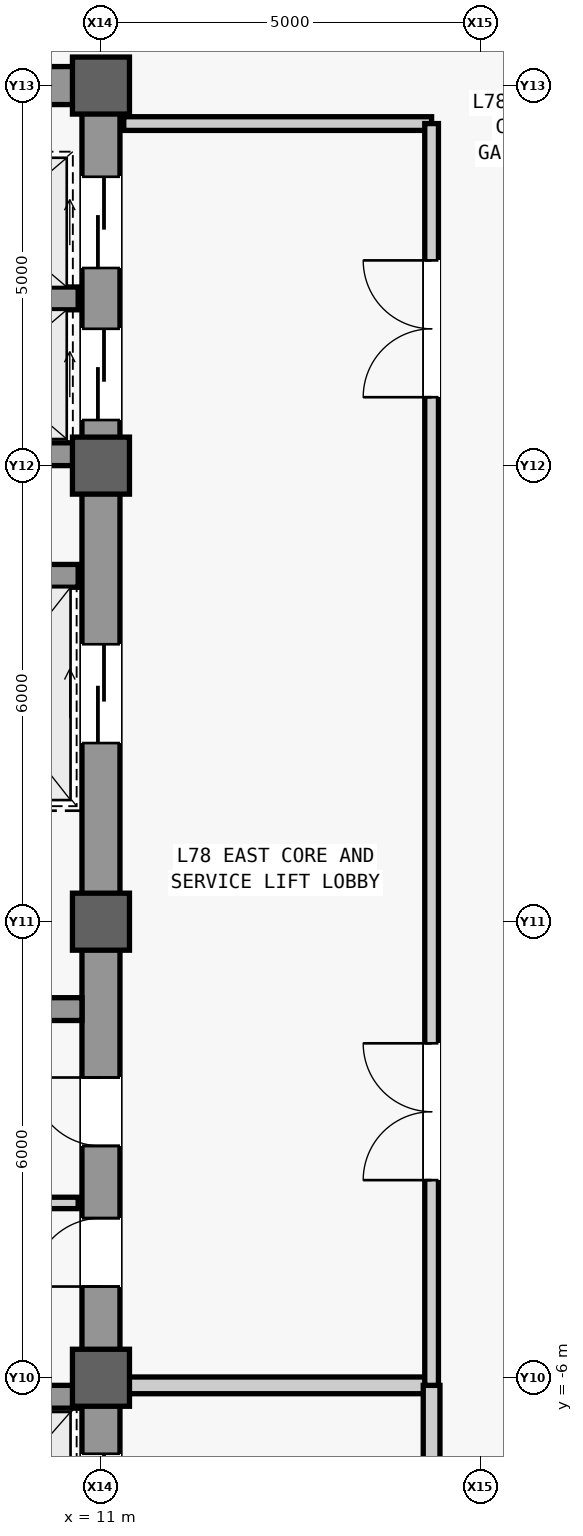
"""IFC4 building model, lengths in metres.
Left out: names, types, materials, properties, quantities, classifications, styles, units other than length and angle.
Written with IfcOpenShell. Run it as: python <this file> out.ifc"""

import sys

from ifc_helpers import new_model, si_unit, direction, frame, frame_2d, origin, origin_2d, place, context, subcontext, project, spatial, rectangle, extrude, source, transform, mapped, element, fill, save


model = new_model("IFC4")
c1 = context("Model", 3, precision=1e-05, world=origin(), true_north=direction((0.0, 1.0)))
c2 = subcontext(c1, "Body", "Model", "MODEL_VIEW")
j1 = project(units=[si_unit("LENGTHUNIT", "METRE"), si_unit("PLANEANGLEUNIT", "RADIAN")], contexts=[c1])
p1 = place(None, origin())
s1 = spatial("IfcSite", under=j1, at=p1, CompositionType="ELEMENT")
p2 = place(p1, origin())
s2 = spatial("IfcBuilding", under=s1, at=p2, CompositionType="ELEMENT")
p3 = place(p2, frame((0.0, 0.0, 330.3)))
s3 = spatial("IfcBuildingStorey", under=s2, at=p3, CompositionType="ELEMENT", Elevation=330.3)
m1 = source(origin(), c2, "Body", "SweptSolid", [
    extrude(rectangle(XDim=22.0, YDim=0.5, at=frame_2d((11.0, 0.0))), origin(), (0.0, 0.0, 1.0), 3.74),
])
p4 = place(p3, frame((11.0, -11.0, 0.0), z_axis=(0.0, 0.0, 1.0), x_axis=(0.0, 1.0, 0.0)))
e1 = element("IfcWall", 1, at=p4, inside=s3, PredefinedType="SHEAR", context=c2, shape_type="MappedRepresentation", body=[
    mapped(m1, transform((0.0, 0.0, 0.0), scale=1.0)),
])
m2 = source(origin(), c2, "Body", "SweptSolid", [
    extrude(rectangle(XDim=1.1, YDim=2.2, at=frame_2d((0.55, 1.1))), frame((0.0, 0.26, 0.0), z_axis=(0.0, -1.0, 0.0), x_axis=(1.0, 0.0, 0.0)), (0.0, 0.0, 1.0), 0.52),
])
p5 = place(p4, frame((0.8, 0.0, 0.0)))
e2 = element("IfcOpeningElement", 2, at=p5, cuts=e1, PredefinedType="OPENING", context=c2, shape_type="MappedRepresentation", body=[
    mapped(m2, transform((0.0, 0.0, 0.0), scale=1.0)),
])
m3 = source(origin(), c2, "Body", "SweptSolid", [
    extrude(rectangle(XDim=0.9, YDim=2.15, at=frame_2d((0.45, 1.075))), frame((0.0, 0.26, 0.0), z_axis=(0.0, -1.0, 0.0), x_axis=(1.0, 0.0, 0.0)), (0.0, 0.0, 1.0), 0.52),
])
p6 = place(p4, frame((6.2, 0.0, 0.0)))
e3 = element("IfcOpeningElement", 3, at=p6, cuts=e1, PredefinedType="OPENING", context=c2, shape_type="MappedRepresentation", body=[
    mapped(m3, transform((0.0, 0.0, 0.0), scale=1.0)),
])
p7 = place(p4, frame((8.05, 0.0, 0.0)))
e4 = element("IfcOpeningElement", 4, at=p7, cuts=e1, PredefinedType="OPENING", context=c2, shape_type="MappedRepresentation", body=[
    mapped(m3, transform((0.0, 0.0, 0.0), scale=1.0)),
])
m4 = source(origin(), c2, "Body", "SweptSolid", [
    extrude(rectangle(XDim=1.2, YDim=2.3, at=frame_2d((0.6, 1.15))), frame((0.0, 0.26, 0.0), z_axis=(0.0, -1.0, 0.0), x_axis=(1.0, 0.0, 0.0)), (0.0, 0.0, 1.0), 0.52),
])
p8 = place(p4, frame((17.6, 0.0, 0.0)))
e5 = element("IfcOpeningElement", 5, at=p8, cuts=e1, PredefinedType="OPENING", context=c2, shape_type="MappedRepresentation", body=[
    mapped(m4, transform((0.0, 0.0, 0.0), scale=1.0)),
])
p9 = place(p4, frame((19.6, 0.0, 0.0)))
e6 = element("IfcOpeningElement", 6, at=p9, cuts=e1, PredefinedType="OPENING", context=c2, shape_type="MappedRepresentation", body=[
    mapped(m4, transform((0.0, 0.0, 0.0), scale=1.0)),
])
m5 = source(origin(), c2, "Body", "SweptSolid", [
    extrude(rectangle(XDim=1.3, YDim=2.3, at=frame_2d((0.65, 1.15))), frame((0.0, 0.26, 0.0), z_axis=(0.0, -1.0, 0.0), x_axis=(1.0, 0.0, 0.0)), (0.0, 0.0, 1.0), 0.52),
])
p10 = place(p4, frame((2.7, 0.0, 0.0)))
e7 = element("IfcOpeningElement", 7, at=p10, cuts=e1, PredefinedType="OPENING", context=c2, shape_type="MappedRepresentation", body=[
    mapped(m5, transform((0.0, 0.0, 0.0), scale=1.0)),
])
p11 = place(p4, frame((13.35, 0.0, 0.0)))
e8 = element("IfcOpeningElement", 8, at=p11, cuts=e1, PredefinedType="OPENING", context=c2, shape_type="MappedRepresentation", body=[
    mapped(m5, transform((0.0, 0.0, 0.0), scale=1.0)),
])
m6 = source(origin(), c2, "Body", "SweptSolid", [
    extrude(rectangle(XDim=5.9, YDim=0.5, at=frame_2d((2.95, 0.0))), origin(), (0.0, 0.0, 1.0), 3.74),
])
p12 = place(p3, frame((4.85, 11.0, 0.0), z_axis=(0.0, 0.0, 1.0), x_axis=(1.0, 0.0, 0.0)))
e9 = element("IfcWall", 9, at=p12, inside=s3, PredefinedType="SHEAR", context=c2, shape_type="MappedRepresentation", body=[
    mapped(m6, transform((0.0, 0.0, 0.0), scale=1.0)),
])
m7 = source(origin(), c2, "Body", "SweptSolid", [
    extrude(rectangle(XDim=1.05, YDim=2.2, at=frame_2d((0.525, 1.1))), frame((0.0, 0.26, 0.0), z_axis=(0.0, -1.0, 0.0), x_axis=(1.0, 0.0, 0.0)), (0.0, 0.0, 1.0), 0.52),
])
p13 = place(p12, frame((1.375, 0.0, 0.0)))
e10 = element("IfcOpeningElement", 10, at=p13, cuts=e9, PredefinedType="OPENING", context=c2, shape_type="MappedRepresentation", body=[
    mapped(m7, transform((0.0, 0.0, 0.0), scale=1.0)),
])
m8 = source(origin(), c2, "Body", "SweptSolid", [
    extrude(rectangle(XDim=5.65, YDim=0.3, at=frame_2d((2.825, 0.0))), origin(), (0.0, 0.0, 1.0), 3.74),
])
p14 = place(p3, frame((5.1, -1.15, 0.0), z_axis=(0.0, 0.0, 1.0), x_axis=(1.0, 0.0, 0.0)))
e11 = element("IfcWall", 11, at=p14, inside=s3, PredefinedType="SHEAR", context=c2, shape_type="MappedRepresentation", body=[
    mapped(m8, transform((0.0, 0.0, 0.0), scale=1.0)),
])
m9 = source(origin(), c2, "Body", "SweptSolid", [
    extrude(rectangle(XDim=0.75, YDim=0.75, at=origin_2d()), origin(), (0.0, 0.0, 1.0), 4.0),
])
for number, where, z_axis, x_axis in (
    (12, (11.0, -6.0, 0.0), (0.0, 0.0, 1.0), (1.0, 0.0, 0.0)),
    (13, (11.0, 0.0, 0.0), (0.0, 0.0, 1.0), (1.0, 0.0, 0.0)),
    (14, (11.0, 6.0, 0.0), (0.0, 0.0, 1.0), (1.0, 0.0, 0.0)),
    (15, (11.0, 11.0, 0.0), (0.0, 0.0, 1.0), (1.0, 0.0, 0.0)),
):
    element("IfcColumn", number, at=place(p3, frame(where, z_axis=z_axis, x_axis=x_axis)), inside=s3, PredefinedType="COLUMN", context=c2, shape_type="MappedRepresentation", body=[
        mapped(m9, transform((0.0, 0.0, 0.0), scale=1.0)),
    ])
m10 = source(origin(), c2, "Body", "SweptSolid", [
    extrude(rectangle(XDim=2.2, YDim=0.3, at=frame_2d((1.1, 0.0))), origin(), (0.0, 0.0, 1.0), 3.74),
])
p15 = place(p3, frame((8.5, -6.25, 0.0), z_axis=(0.0, 0.0, 1.0), x_axis=(1.0, 0.0, 0.0)))
e16 = element("IfcWall", 16, at=p15, inside=s3, PredefinedType="SHEAR", context=c2, shape_type="MappedRepresentation", body=[
    mapped(m10, transform((0.0, 0.0, 0.0), scale=1.0)),
])
m11 = source(origin(), c2, "Body", "SweptSolid", [
    extrude(rectangle(XDim=2.3, YDim=0.3, at=frame_2d((1.15, 0.0))), origin(), (0.0, 0.0, 1.0), 3.74),
])
for number, where, z_axis, x_axis in (
    (17, (8.4, 4.55, 0.0), (0.0, 0.0, 1.0), (1.0, 0.0, 0.0)),
    (18, (8.4, 6.15, 0.0), (0.0, 0.0, 1.0), (1.0, 0.0, 0.0)),
    (19, (8.4, 8.2, 0.0), (0.0, 0.0, 1.0), (1.0, 0.0, 0.0)),
):
    element("IfcWall", number, at=place(p3, frame(where, z_axis=z_axis, x_axis=x_axis)), inside=s3, PredefinedType="SHEAR", context=c2, shape_type="MappedRepresentation", body=[
        mapped(m11, transform((0.0, 0.0, 0.0), scale=1.0)),
    ])
m12 = source(origin(), c2, "Body", "SweptSolid", [
    extrude(rectangle(XDim=2.05, YDim=0.15, at=frame_2d((1.025, 0.0))), origin(), (0.0, 0.0, 1.0), 3.74),
])
p16 = place(p3, frame((8.65, -3.7, 0.0), z_axis=(0.0, 0.0, 1.0), x_axis=(1.0, 0.0, 0.0)))
e20 = element("IfcWall", 20, at=p16, inside=s3, PredefinedType="PARTITIONING", context=c2, shape_type="MappedRepresentation", body=[
    mapped(m12, transform((0.0, 0.0, 0.0), scale=1.0)),
])
m13 = source(origin(), c2, "Body", "SweptSolid", [
    extrude(rectangle(XDim=4.05, YDim=0.22, at=frame_2d((2.025, 0.0))), origin(), (0.0, 0.0, 1.0), 3.124),
])
p17 = place(p3, frame((11.3, -6.1, 0.0), z_axis=(0.0, 0.0, 1.0), x_axis=(1.0, 0.0, 0.0)))
e21 = element("IfcWall", 21, at=p17, inside=s3, PredefinedType="PARTITIONING", context=c2, shape_type="MappedRepresentation", body=[
    mapped(m13, transform((0.0, 0.0, 0.0), scale=1.0)),
])
m14 = source(origin(), c2, "Body", "SweptSolid", [
    extrude(rectangle(XDim=4.4, YDim=0.22, at=frame_2d((2.2, 0.0))), origin(), (0.0, 0.0, 1.0), 3.74),
])
p18 = place(p3, frame((15.35, -10.5, 0.0), z_axis=(0.0, 0.0, 1.0), x_axis=(0.0, 1.0, 0.0)))
e22 = element("IfcWall", 22, at=p18, inside=s3, PredefinedType="PARTITIONING", context=c2, shape_type="MappedRepresentation", body=[
    mapped(m14, transform((0.0, 0.0, 0.0), scale=1.0)),
])
m15 = source(origin(), c2, "Body", "SweptSolid", [
    extrude(rectangle(XDim=1.2, YDim=2.2, at=frame_2d((0.6, 1.1))), frame((0.0, 0.12, 0.0), z_axis=(0.0, -1.0, 0.0), x_axis=(1.0, 0.0, 0.0)), (0.0, 0.0, 1.0), 0.24),
])
p19 = place(p18, frame((1.6, 0.0, 0.0)))
e23 = element("IfcOpeningElement", 23, at=p19, cuts=e22, PredefinedType="OPENING", context=c2, shape_type="MappedRepresentation", body=[
    mapped(m15, transform((0.0, 0.0, 0.0), scale=1.0)),
])
m16 = source(origin(), c2, "Body", "SweptSolid", [
    extrude(rectangle(XDim=4.05, YDim=0.18, at=frame_2d((2.025, 0.0))), origin(), (0.0, 0.0, 1.0), 3.74),
])
p20 = place(p3, frame((11.3, 10.5, 0.0), z_axis=(0.0, 0.0, 1.0), x_axis=(1.0, 0.0, 0.0)))
e24 = element("IfcWall", 24, at=p20, inside=s3, PredefinedType="PARTITIONING", context=c2, shape_type="MappedRepresentation", body=[
    mapped(m16, transform((0.0, 0.0, 0.0), scale=1.0)),
])
m17 = source(origin(), c2, "Body", "SweptSolid", [
    extrude(rectangle(XDim=16.6, YDim=0.18, at=frame_2d((8.3, 0.0))), origin(), (0.0, 0.0, 1.0), 3.74),
])
p21 = place(p3, frame((15.35, -6.1, 0.0), z_axis=(0.0, 0.0, 1.0), x_axis=(0.0, 1.0, 0.0)))
e25 = element("IfcWall", 25, at=p21, inside=s3, PredefinedType="PARTITIONING", context=c2, shape_type="MappedRepresentation", body=[
    mapped(m17, transform((0.0, 0.0, 0.0), scale=1.0)),
])
m18 = source(origin(), c2, "Body", "SweptSolid", [
    extrude(rectangle(XDim=1.8, YDim=2.25, at=frame_2d((0.9, 1.125))), frame((0.0, 0.1, 0.0), z_axis=(0.0, -1.0, 0.0), x_axis=(1.0, 0.0, 0.0)), (0.0, 0.0, 1.0), 0.2),
])
p22 = place(p21, frame((2.7, 0.0, 0.0)))
e26 = element("IfcOpeningElement", 26, at=p22, cuts=e25, PredefinedType="OPENING", context=c2, shape_type="MappedRepresentation", body=[
    mapped(m18, transform((0.0, 0.0, 0.0), scale=1.0)),
])
p23 = place(p21, frame((13.0, 0.0, 0.0)))
e27 = element("IfcOpeningElement", 27, at=p23, cuts=e25, PredefinedType="OPENING", context=c2, shape_type="MappedRepresentation", body=[
    mapped(m18, transform((0.0, 0.0, 0.0), scale=1.0)),
])
m19 = source(origin(), c2, "Body", "SweptSolid", [
    extrude(rectangle(XDim=0.9, YDim=2.15, at=frame_2d((0.45, 1.075))), frame((0.0, 0.025, 0.0), z_axis=(0.0, -1.0, 0.0), x_axis=(1.0, 0.0, 0.0)), (0.0, 0.0, 1.0), 0.05),
])
p24 = place(p6, origin())
e28 = element("IfcDoor", 28, at=p24, inside=s3, OperationType="SINGLE_SWING_LEFT", PredefinedType="DOOR", context=c2, shape_type="MappedRepresentation", body=[
    mapped(m19, transform((0.0, 0.0, 0.0), scale=1.0)),
])
fill(e3, e28)
p25 = place(p7, origin())
e29 = element("IfcDoor", 29, at=p25, inside=s3, OperationType="SINGLE_SWING_RIGHT", PredefinedType="DOOR", context=c2, shape_type="MappedRepresentation", body=[
    mapped(m19, transform((0.0, 0.0, 0.0), scale=1.0)),
])
fill(e4, e29)
m20 = source(origin(), c2, "Body", "SweptSolid", [
    extrude(rectangle(XDim=1.8, YDim=2.25, at=frame_2d((0.9, 1.125))), frame((0.0, 0.025, 0.0), z_axis=(0.0, -1.0, 0.0), x_axis=(1.0, 0.0, 0.0)), (0.0, 0.0, 1.0), 0.05),
])
p26 = place(p22, origin())
e30 = element("IfcDoor", 30, at=p26, inside=s3, OperationType="SINGLE_SWING_RIGHT", PredefinedType="DOOR", context=c2, shape_type="MappedRepresentation", body=[
    mapped(m20, transform((0.0, 0.0, 0.0), scale=1.0)),
])
fill(e26, e30)
p27 = place(p23, origin())
e31 = element("IfcDoor", 31, at=p27, inside=s3, OperationType="SINGLE_SWING_LEFT", PredefinedType="DOOR", context=c2, shape_type="MappedRepresentation", body=[
    mapped(m20, transform((0.0, 0.0, 0.0), scale=1.0)),
])
fill(e27, e31)
m21 = source(origin(), c2, "Body", "SweptSolid", [
    extrude(rectangle(XDim=1.2, YDim=2.3, at=frame_2d((0.6, 1.15))), frame((0.0, 0.025, 0.0), z_axis=(0.0, -1.0, 0.0), x_axis=(1.0, 0.0, 0.0)), (0.0, 0.0, 1.0), 0.05),
])
p28 = place(p8, origin())
e32 = element("IfcDoor", 32, at=p28, inside=s3, OperationType="SLIDING_TO_LEFT", PredefinedType="DOOR", context=c2, shape_type="MappedRepresentation", body=[
    mapped(m21, transform((0.0, 0.0, 0.0), scale=1.0)),
])
fill(e5, e32)
p29 = place(p9, origin())
e33 = element("IfcDoor", 33, at=p29, inside=s3, OperationType="SLIDING_TO_LEFT", PredefinedType="DOOR", context=c2, shape_type="MappedRepresentation", body=[
    mapped(m21, transform((0.0, 0.0, 0.0), scale=1.0)),
])
fill(e6, e33)
m22 = source(origin(), c2, "Body", "SweptSolid", [
    extrude(rectangle(XDim=1.3, YDim=2.3, at=frame_2d((0.65, 1.15))), frame((0.0, 0.025, 0.0), z_axis=(0.0, -1.0, 0.0), x_axis=(1.0, 0.0, 0.0)), (0.0, 0.0, 1.0), 0.05),
])
p30 = place(p10, origin())
e34 = element("IfcDoor", 34, at=p30, inside=s3, OperationType="SLIDING_TO_LEFT", PredefinedType="DOOR", context=c2, shape_type="MappedRepresentation", body=[
    mapped(m22, transform((0.0, 0.0, 0.0), scale=1.0)),
])
fill(e7, e34)
p31 = place(p11, origin())
e35 = element("IfcDoor", 35, at=p31, inside=s3, OperationType="SLIDING_TO_LEFT", PredefinedType="DOOR", context=c2, shape_type="MappedRepresentation", body=[
    mapped(m22, transform((0.0, 0.0, 0.0), scale=1.0)),
])
fill(e8, e35)
save(model, sys.argv[1])
